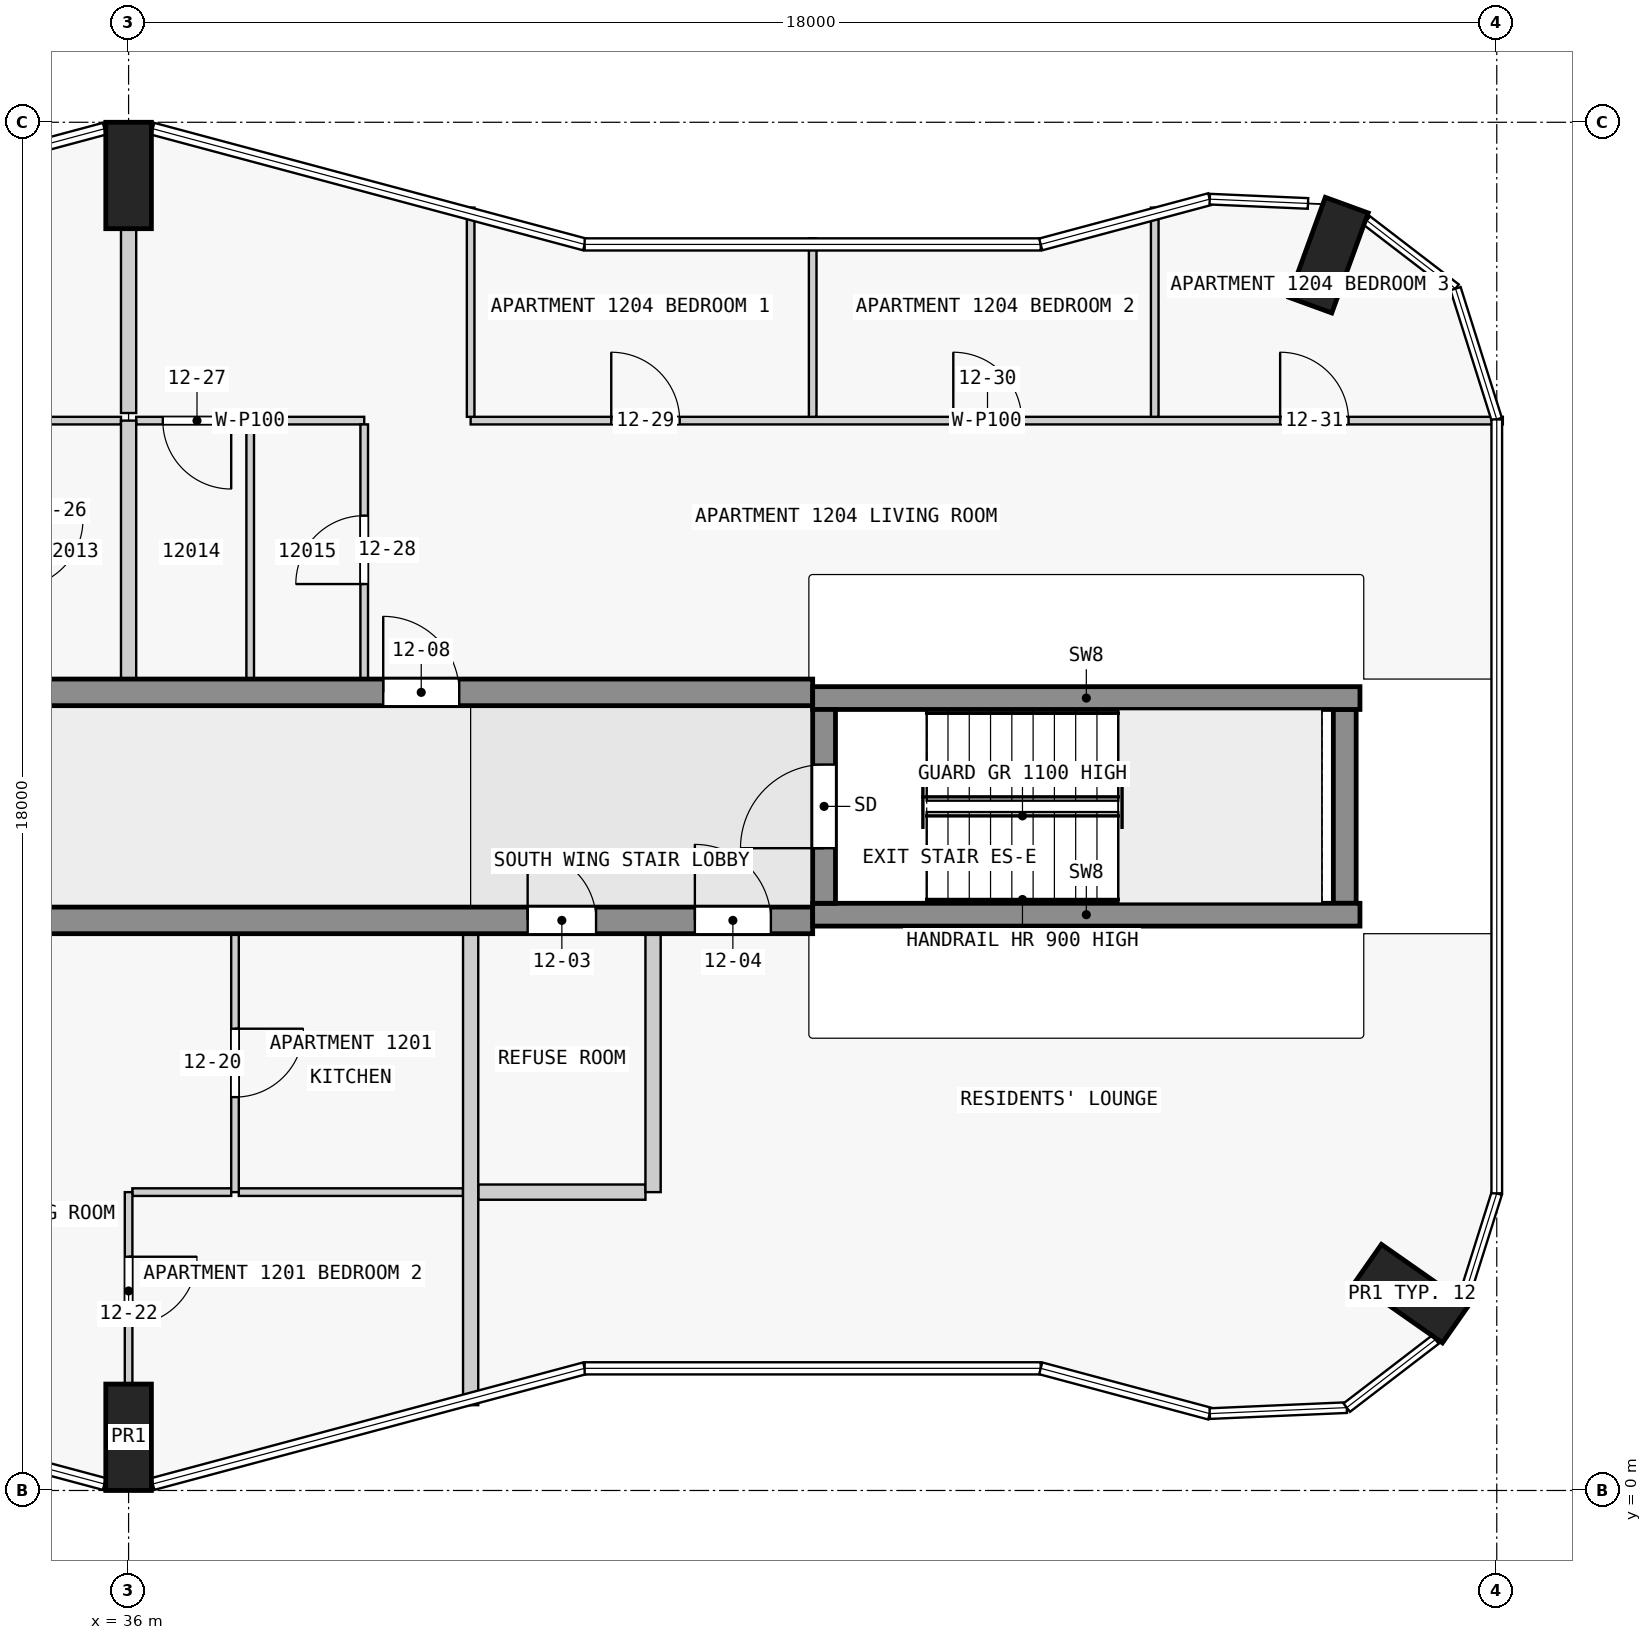
"""IFC4 building model, lengths in metres.
Left out: names, types, materials, properties, quantities, classifications, styles, units other than length and angle.
Written with IfcOpenShell. Run it as: python <this file> out.ifc"""

import sys

from ifc_helpers import new_model, si_unit, direction, frame, frame_2d, origin, origin_2d, place, context, subcontext, project, spatial, rectangle, extrude, element, fill, save


model = new_model("IFC4")
c1 = context("Model", 3, precision=1e-05, world=origin(), true_north=direction((0.0, 1.0)))
c2 = subcontext(c1, "Body", "Model", "MODEL_VIEW")
j1 = project(units=[si_unit("LENGTHUNIT", "METRE"), si_unit("PLANEANGLEUNIT", "RADIAN")], contexts=[c1])
p1 = place(None, origin())
s1 = spatial("IfcSite", under=j1, at=p1, CompositionType="ELEMENT")
p2 = place(p1, origin())
s2 = spatial("IfcBuilding", under=s1, at=p2, CompositionType="ELEMENT")
p3 = place(p2, frame((0.0, 0.0, 51.3)))
s3 = spatial("IfcBuildingStorey", under=s2, at=p3, CompositionType="ELEMENT", Elevation=51.3)
for number, where, z_axis, x_axis in (
    (1, (36.0, 0.7, 0.0), (0.0, 0.0, 1.0), (1.0, 0.0, 0.0)),
    (2, (52.884, 2.59, 0.0), (0.0, 0.0, 1.0), (0.574, 0.819, 0.0)),
    (3, (51.787, 16.252, 0.0), (0.0, 0.0, 1.0), (-0.94, 0.342, 0.0)),
    (4, (36.0, 17.3, 0.0), (0.0, 0.0, 1.0), (1.0, 0.0, 0.0)),
):
    element("IfcColumn", number, at=place(p3, frame(where, z_axis=z_axis, x_axis=x_axis)), inside=s3, PredefinedType="COLUMN", context=c2, shape_type="SweptSolid", body=[
        extrude(rectangle(XDim=0.6, YDim=1.4, at=origin_2d()), origin(), (0.0, 0.0, 1.0), 3.5),
    ])
p4 = place(p3, frame((45.15, 7.725, 0.0), z_axis=(0.0, 0.0, 1.0), x_axis=(0.0, 1.0, 0.0)))
e5 = element("IfcWall", 5, at=p4, inside=s3, PredefinedType="SHEAR", context=c2, shape_type="SweptSolid", body=[
    extrude(rectangle(XDim=2.55, YDim=0.3, at=frame_2d((1.275, 0.0))), origin(), (0.0, 0.0, 1.0), 3.5),
])
p5 = place(p4, frame((0.725, 0.0, 0.0)))
e6 = element("IfcOpeningElement", 6, at=p5, cuts=e5, PredefinedType="OPENING", context=c2, shape_type="SweptSolid", body=[
    extrude(rectangle(XDim=1.1, YDim=2.1, at=frame_2d((0.55, 1.05))), frame((0.0, 0.16, 0.0), z_axis=(0.0, -1.0, 0.0), x_axis=(1.0, 0.0, 0.0)), (0.0, 0.0, 1.0), 0.32),
])
p6 = place(p3, frame((52.0, 7.725, 0.0), z_axis=(0.0, 0.0, 1.0), x_axis=(0.0, 1.0, 0.0)))
e7 = element("IfcWall", 7, at=p6, inside=s3, PredefinedType="SHEAR", context=c2, shape_type="SweptSolid", body=[
    extrude(rectangle(XDim=2.55, YDim=0.3, at=frame_2d((1.275, 0.0))), origin(), (0.0, 0.0, 1.0), 3.5),
])
for number, where, z_axis, x_axis in (
    (8, (45.0, 7.575, 0.0), (0.0, 0.0, 1.0), (1.0, 0.0, 0.0)),
    (9, (45.0, 10.425, 0.0), (0.0, 0.0, 1.0), (1.0, 0.0, 0.0)),
):
    element("IfcWall", number, at=place(p3, frame(where, z_axis=z_axis, x_axis=x_axis)), inside=s3, PredefinedType="SHEAR", context=c2, shape_type="SweptSolid", body=[
        extrude(rectangle(XDim=7.2, YDim=0.3, at=frame_2d((3.6, 0.0))), origin(), (0.0, 0.0, 1.0), 3.5),
    ])
p7 = place(p3, frame((22.5, 7.5, 0.0), z_axis=(0.0, 0.0, 1.0), x_axis=(1.0, 0.0, 0.0)))
e10 = element("IfcWall", 10, at=p7, inside=s3, PredefinedType="SHEAR", context=c2, shape_type="SweptSolid", body=[
    extrude(rectangle(XDim=22.5, YDim=0.35, at=frame_2d((11.25, 0.0))), origin(), (0.0, 0.0, 1.0), 3.25),
])
p8 = place(p7, frame((1.75, 0.0, 0.0)))
e11 = element("IfcOpeningElement", 11, at=p8, cuts=e10, PredefinedType="OPENING", context=c2, shape_type="SweptSolid", body=[
    extrude(rectangle(XDim=1.0, YDim=2.1, at=frame_2d((0.5, 1.05))), frame((0.0, 0.185, 0.0), z_axis=(0.0, -1.0, 0.0), x_axis=(1.0, 0.0, 0.0)), (0.0, 0.0, 1.0), 0.37),
])
p9 = place(p7, frame((10.15, 0.0, 0.0)))
e12 = element("IfcOpeningElement", 12, at=p9, cuts=e10, PredefinedType="OPENING", context=c2, shape_type="SweptSolid", body=[
    extrude(rectangle(XDim=1.0, YDim=2.1, at=frame_2d((0.5, 1.05))), frame((0.0, 0.185, 0.0), z_axis=(0.0, -1.0, 0.0), x_axis=(1.0, 0.0, 0.0)), (0.0, 0.0, 1.0), 0.37),
])
p10 = place(p7, frame((18.75, 0.0, 0.0)))
e13 = element("IfcOpeningElement", 13, at=p10, cuts=e10, PredefinedType="OPENING", context=c2, shape_type="SweptSolid", body=[
    extrude(rectangle(XDim=0.9, YDim=2.1, at=frame_2d((0.45, 1.05))), frame((0.0, 0.185, 0.0), z_axis=(0.0, -1.0, 0.0), x_axis=(1.0, 0.0, 0.0)), (0.0, 0.0, 1.0), 0.37),
])
p11 = place(p7, frame((20.95, 0.0, 0.0)))
e14 = element("IfcOpeningElement", 14, at=p11, cuts=e10, PredefinedType="OPENING", context=c2, shape_type="SweptSolid", body=[
    extrude(rectangle(XDim=1.0, YDim=2.1, at=frame_2d((0.5, 1.05))), frame((0.0, 0.185, 0.0), z_axis=(0.0, -1.0, 0.0), x_axis=(1.0, 0.0, 0.0)), (0.0, 0.0, 1.0), 0.37),
])
p12 = place(p3, frame((22.5, 10.5, 0.0), z_axis=(0.0, 0.0, 1.0), x_axis=(1.0, 0.0, 0.0)))
e15 = element("IfcWall", 15, at=p12, inside=s3, PredefinedType="SHEAR", context=c2, shape_type="SweptSolid", body=[
    extrude(rectangle(XDim=22.5, YDim=0.35, at=frame_2d((11.25, 0.0))), origin(), (0.0, 0.0, 1.0), 3.25),
])
p13 = place(p12, frame((1.75, 0.0, 0.0)))
e16 = element("IfcOpeningElement", 16, at=p13, cuts=e15, PredefinedType="OPENING", context=c2, shape_type="SweptSolid", body=[
    extrude(rectangle(XDim=1.0, YDim=2.1, at=frame_2d((0.5, 1.05))), frame((0.0, 0.185, 0.0), z_axis=(0.0, -1.0, 0.0), x_axis=(1.0, 0.0, 0.0)), (0.0, 0.0, 1.0), 0.37),
])
p14 = place(p12, frame((6.25, 0.0, 0.0)))
e17 = element("IfcOpeningElement", 17, at=p14, cuts=e15, PredefinedType="OPENING", context=c2, shape_type="SweptSolid", body=[
    extrude(rectangle(XDim=1.0, YDim=2.1, at=frame_2d((0.5, 1.05))), frame((0.0, 0.185, 0.0), z_axis=(0.0, -1.0, 0.0), x_axis=(1.0, 0.0, 0.0)), (0.0, 0.0, 1.0), 0.37),
])
p15 = place(p12, frame((10.75, 0.0, 0.0)))
e18 = element("IfcOpeningElement", 18, at=p15, cuts=e15, PredefinedType="OPENING", context=c2, shape_type="SweptSolid", body=[
    extrude(rectangle(XDim=1.0, YDim=2.1, at=frame_2d((0.5, 1.05))), frame((0.0, 0.185, 0.0), z_axis=(0.0, -1.0, 0.0), x_axis=(1.0, 0.0, 0.0)), (0.0, 0.0, 1.0), 0.37),
])
p16 = place(p12, frame((16.85, 0.0, 0.0)))
e19 = element("IfcOpeningElement", 19, at=p16, cuts=e15, PredefinedType="OPENING", context=c2, shape_type="SweptSolid", body=[
    extrude(rectangle(XDim=1.0, YDim=2.1, at=frame_2d((0.5, 1.05))), frame((0.0, 0.185, 0.0), z_axis=(0.0, -1.0, 0.0), x_axis=(1.0, 0.0, 0.0)), (0.0, 0.0, 1.0), 0.37),
])
p17 = place(p3, frame((37.35, 3.925, 0.0), z_axis=(0.0, 0.0, 1.0), x_axis=(-1.0, 0.0, 0.0)))
e20 = element("IfcWall", 20, at=p17, inside=s3, PredefinedType="PARTITIONING", context=c2, shape_type="SweptSolid", body=[
    extrude(rectangle(XDim=1.3, YDim=0.1, at=frame_2d((0.65, 0.0))), origin(), (0.0, 0.0, 1.0), 3.25),
])
p18 = place(p3, frame((37.45, 3.925, 0.0), z_axis=(0.0, 0.0, 1.0), x_axis=(1.0, 0.0, 0.0)))
e21 = element("IfcWall", 21, at=p18, inside=s3, PredefinedType="PARTITIONING", context=c2, shape_type="SweptSolid", body=[
    extrude(rectangle(XDim=2.95, YDim=0.1, at=frame_2d((1.475, 0.0))), origin(), (0.0, 0.0, 1.0), 3.25),
])
p19 = place(p3, frame((40.6, 3.925, 0.0), z_axis=(0.0, 0.0, 1.0), x_axis=(1.0, 0.0, 0.0)))
e22 = element("IfcWall", 22, at=p19, inside=s3, PredefinedType="PARTITIONING", context=c2, shape_type="SweptSolid", body=[
    extrude(rectangle(XDim=2.2, YDim=0.2, at=frame_2d((1.1, 0.0))), origin(), (0.0, 0.0, 1.0), 3.25),
])
p20 = place(p3, frame((35.9, 14.075, 0.0), z_axis=(0.0, 0.0, 1.0), x_axis=(-1.0, 0.0, 0.0)))
e23 = element("IfcWall", 23, at=p20, inside=s3, PredefinedType="PARTITIONING", context=c2, shape_type="SweptSolid", body=[
    extrude(rectangle(XDim=1.4, YDim=0.1, at=frame_2d((0.7, 0.0))), origin(), (0.0, 0.0, 1.0), 3.25),
])
p21 = place(p3, frame((39.1, 14.075, 0.0), z_axis=(0.0, 0.0, 1.0), x_axis=(-1.0, 0.0, 0.0)))
e24 = element("IfcWall", 24, at=p21, inside=s3, PredefinedType="PARTITIONING", context=c2, shape_type="SweptSolid", body=[
    extrude(rectangle(XDim=3.0, YDim=0.1, at=frame_2d((1.5, 0.0))), origin(), (0.0, 0.0, 1.0), 3.25),
])
p22 = place(p21, frame((1.75, 0.0, 0.0)))
e25 = element("IfcOpeningElement", 25, at=p22, cuts=e24, PredefinedType="OPENING", context=c2, shape_type="SweptSolid", body=[
    extrude(rectangle(XDim=0.9, YDim=2.1, at=frame_2d((0.45, 1.05))), frame((0.0, 0.06, 0.0), z_axis=(0.0, -1.0, 0.0), x_axis=(1.0, 0.0, 0.0)), (0.0, 0.0, 1.0), 0.12),
])
p23 = place(p3, frame((40.5, 14.075, 0.0), z_axis=(0.0, 0.0, 1.0), x_axis=(1.0, 0.0, 0.0)))
e26 = element("IfcWall", 26, at=p23, inside=s3, PredefinedType="PARTITIONING", context=c2, shape_type="SweptSolid", body=[
    extrude(rectangle(XDim=13.58, YDim=0.1, at=frame_2d((6.79, 0.0))), origin(), (0.0, 0.0, 1.0), 3.25),
])
p24 = place(p23, frame((1.85, 0.0, 0.0)))
e27 = element("IfcOpeningElement", 27, at=p24, cuts=e26, PredefinedType="OPENING", context=c2, shape_type="SweptSolid", body=[
    extrude(rectangle(XDim=0.9, YDim=2.1, at=frame_2d((0.45, 1.05))), frame((0.0, 0.06, 0.0), z_axis=(0.0, -1.0, 0.0), x_axis=(1.0, 0.0, 0.0)), (0.0, 0.0, 1.0), 0.12),
])
p25 = place(p23, frame((6.35, 0.0, 0.0)))
e28 = element("IfcOpeningElement", 28, at=p25, cuts=e26, PredefinedType="OPENING", context=c2, shape_type="SweptSolid", body=[
    extrude(rectangle(XDim=0.9, YDim=2.1, at=frame_2d((0.45, 1.05))), frame((0.0, 0.06, 0.0), z_axis=(0.0, -1.0, 0.0), x_axis=(1.0, 0.0, 0.0)), (0.0, 0.0, 1.0), 0.12),
])
p26 = place(p23, frame((10.65, 0.0, 0.0)))
e29 = element("IfcOpeningElement", 29, at=p26, cuts=e26, PredefinedType="OPENING", context=c2, shape_type="SweptSolid", body=[
    extrude(rectangle(XDim=0.9, YDim=2.1, at=frame_2d((0.45, 1.05))), frame((0.0, 0.06, 0.0), z_axis=(0.0, -1.0, 0.0), x_axis=(1.0, 0.0, 0.0)), (0.0, 0.0, 1.0), 0.12),
])
p27 = place(p3, frame((36.0, 3.925, 0.0), z_axis=(0.0, 0.0, 1.0), x_axis=(0.0, -1.0, 0.0)))
e30 = element("IfcWall", 30, at=p27, inside=s3, PredefinedType="PARTITIONING", context=c2, shape_type="SweptSolid", body=[
    extrude(rectangle(XDim=2.525, YDim=0.1, at=frame_2d((1.263, 0.0))), origin(), (0.0, 0.0, 1.0), 3.25),
])
p28 = place(p27, frame((0.85, 0.0, 0.0)))
e31 = element("IfcOpeningElement", 31, at=p28, cuts=e30, PredefinedType="OPENING", context=c2, shape_type="SweptSolid", body=[
    extrude(rectangle(XDim=0.9, YDim=2.1, at=frame_2d((0.45, 1.05))), frame((0.0, 0.06, 0.0), z_axis=(0.0, -1.0, 0.0), x_axis=(1.0, 0.0, 0.0)), (0.0, 0.0, 1.0), 0.12),
])
p29 = place(p3, frame((36.0, 16.6, 0.0), z_axis=(0.0, 0.0, 1.0), x_axis=(0.0, -1.0, 0.0)))
e32 = element("IfcWall", 32, at=p29, inside=s3, PredefinedType="PARTITIONING", context=c2, shape_type="SweptSolid", body=[
    extrude(rectangle(XDim=2.425, YDim=0.2, at=frame_2d((1.212, 0.0))), origin(), (0.0, 0.0, 1.0), 3.25),
])
p30 = place(p3, frame((36.0, 10.675, 0.0), z_axis=(0.0, 0.0, 1.0), x_axis=(0.0, 1.0, 0.0)))
e33 = element("IfcWall", 33, at=p30, inside=s3, PredefinedType="PARTITIONING", context=c2, shape_type="SweptSolid", body=[
    extrude(rectangle(XDim=3.4, YDim=0.2, at=frame_2d((1.7, 0.0))), origin(), (0.0, 0.0, 1.0), 3.25),
])
p31 = place(p3, frame((37.4, 7.325, 0.0), z_axis=(0.0, 0.0, 1.0), x_axis=(0.0, -1.0, 0.0)))
e34 = element("IfcWall", 34, at=p31, inside=s3, PredefinedType="PARTITIONING", context=c2, shape_type="SweptSolid", body=[
    extrude(rectangle(XDim=3.4, YDim=0.1, at=frame_2d((1.7, 0.0))), origin(), (0.0, 0.0, 1.0), 3.25),
])
p32 = place(p31, frame((1.25, 0.0, 0.0)))
e35 = element("IfcOpeningElement", 35, at=p32, cuts=e34, PredefinedType="OPENING", context=c2, shape_type="SweptSolid", body=[
    extrude(rectangle(XDim=0.9, YDim=2.1, at=frame_2d((0.45, 1.05))), frame((0.0, 0.06, 0.0), z_axis=(0.0, -1.0, 0.0), x_axis=(1.0, 0.0, 0.0)), (0.0, 0.0, 1.0), 0.12),
])
p33 = place(p3, frame((37.6, 10.675, 0.0), z_axis=(0.0, 0.0, 1.0), x_axis=(0.0, 1.0, 0.0)))
e36 = element("IfcWall", 36, at=p33, inside=s3, PredefinedType="PARTITIONING", context=c2, shape_type="SweptSolid", body=[
    extrude(rectangle(XDim=3.35, YDim=0.1, at=frame_2d((1.675, 0.0))), origin(), (0.0, 0.0, 1.0), 3.25),
])
p34 = place(p3, frame((39.1, 10.675, 0.0), z_axis=(0.0, 0.0, 1.0), x_axis=(0.0, 1.0, 0.0)))
e37 = element("IfcWall", 37, at=p34, inside=s3, PredefinedType="PARTITIONING", context=c2, shape_type="SweptSolid", body=[
    extrude(rectangle(XDim=3.35, YDim=0.1, at=frame_2d((1.675, 0.0))), origin(), (0.0, 0.0, 1.0), 3.25),
])
p35 = place(p34, frame((1.25, 0.0, 0.0)))
e38 = element("IfcOpeningElement", 38, at=p35, cuts=e37, PredefinedType="OPENING", context=c2, shape_type="SweptSolid", body=[
    extrude(rectangle(XDim=0.9, YDim=2.1, at=frame_2d((0.45, 1.05))), frame((0.0, 0.06, 0.0), z_axis=(0.0, -1.0, 0.0), x_axis=(1.0, 0.0, 0.0)), (0.0, 0.0, 1.0), 0.12),
])
p36 = place(p3, frame((40.5, 16.878, 0.0), z_axis=(0.0, 0.0, 1.0), x_axis=(0.0, -1.0, 0.0)))
e39 = element("IfcWall", 39, at=p36, inside=s3, PredefinedType="PARTITIONING", context=c2, shape_type="SweptSolid", body=[
    extrude(rectangle(XDim=2.753, YDim=0.1, at=frame_2d((1.376, 0.0))), origin(), (0.0, 0.0, 1.0), 3.25),
])
p37 = place(p3, frame((40.5, 1.122, 0.0), z_axis=(0.0, 0.0, 1.0), x_axis=(0.0, 1.0, 0.0)))
e40 = element("IfcWall", 40, at=p37, inside=s3, PredefinedType="PARTITIONING", context=c2, shape_type="SweptSolid", body=[
    extrude(rectangle(XDim=6.203, YDim=0.2, at=frame_2d((3.101, 0.0))), origin(), (0.0, 0.0, 1.0), 3.25),
])
p38 = place(p3, frame((42.9, 3.925, 0.0), z_axis=(0.0, 0.0, 1.0), x_axis=(0.0, 1.0, 0.0)))
e41 = element("IfcWall", 41, at=p38, inside=s3, PredefinedType="PARTITIONING", context=c2, shape_type="SweptSolid", body=[
    extrude(rectangle(XDim=3.4, YDim=0.2, at=frame_2d((1.7, 0.0))), origin(), (0.0, 0.0, 1.0), 3.25),
])
p39 = place(p3, frame((45.0, 14.125, 0.0), z_axis=(0.0, 0.0, 1.0), x_axis=(0.0, 1.0, 0.0)))
e42 = element("IfcWall", 42, at=p39, inside=s3, PredefinedType="PARTITIONING", context=c2, shape_type="SweptSolid", body=[
    extrude(rectangle(XDim=2.348, YDim=0.1, at=frame_2d((1.174, 0.0))), origin(), (0.0, 0.0, 1.0), 3.25),
])
p40 = place(p3, frame((49.5, 14.125, 0.0), z_axis=(0.0, 0.0, 1.0), x_axis=(0.0, 1.0, 0.0)))
e43 = element("IfcWall", 43, at=p40, inside=s3, PredefinedType="PARTITIONING", context=c2, shape_type="SweptSolid", body=[
    extrude(rectangle(XDim=2.753, YDim=0.1, at=frame_2d((1.376, 0.0))), origin(), (0.0, 0.0, 1.0), 3.25),
])
p41 = place(p5, origin())
e44 = element("IfcDoor", 44, at=p41, inside=s3, OperationType="SINGLE_SWING_LEFT", PredefinedType="DOOR", context=c2, shape_type="SweptSolid", body=[
    extrude(rectangle(XDim=1.1, YDim=2.1, at=frame_2d((0.55, 1.05))), frame((0.0, 0.025, 0.0), z_axis=(0.0, -1.0, 0.0), x_axis=(1.0, 0.0, 0.0)), (0.0, 0.0, 1.0), 0.05),
])
fill(e6, e44)
p42 = place(p10, origin())
e45 = element("IfcDoor", 45, at=p42, inside=s3, OperationType="SINGLE_SWING_RIGHT", PredefinedType="DOOR", context=c2, shape_type="SweptSolid", body=[
    extrude(rectangle(XDim=0.9, YDim=2.1, at=frame_2d((0.45, 1.05))), frame((0.0, 0.025, 0.0), z_axis=(0.0, -1.0, 0.0), x_axis=(1.0, 0.0, 0.0)), (0.0, 0.0, 1.0), 0.05),
])
fill(e13, e45)
p43 = place(p11, origin())
e46 = element("IfcDoor", 46, at=p43, inside=s3, OperationType="SINGLE_SWING_RIGHT", PredefinedType="DOOR", context=c2, shape_type="SweptSolid", body=[
    extrude(rectangle(XDim=1.0, YDim=2.1, at=frame_2d((0.5, 1.05))), frame((0.0, 0.025, 0.0), z_axis=(0.0, -1.0, 0.0), x_axis=(1.0, 0.0, 0.0)), (0.0, 0.0, 1.0), 0.05),
])
fill(e14, e46)
p44 = place(p16, origin())
e47 = element("IfcDoor", 47, at=p44, inside=s3, OperationType="SINGLE_SWING_RIGHT", PredefinedType="DOOR", context=c2, shape_type="SweptSolid", body=[
    extrude(rectangle(XDim=1.0, YDim=2.1, at=frame_2d((0.5, 1.05))), frame((0.0, 0.025, 0.0), z_axis=(0.0, -1.0, 0.0), x_axis=(1.0, 0.0, 0.0)), (0.0, 0.0, 1.0), 0.05),
])
fill(e19, e47)
p45 = place(p32, origin())
e48 = element("IfcDoor", 48, at=p45, inside=s3, OperationType="SINGLE_SWING_LEFT", PredefinedType="DOOR", context=c2, shape_type="SweptSolid", body=[
    extrude(rectangle(XDim=0.9, YDim=2.1, at=frame_2d((0.45, 1.05))), frame((0.0, 0.025, 0.0), z_axis=(0.0, -1.0, 0.0), x_axis=(1.0, 0.0, 0.0)), (0.0, 0.0, 1.0), 0.05),
])
fill(e35, e48)
p46 = place(p28, origin())
e49 = element("IfcDoor", 49, at=p46, inside=s3, OperationType="SINGLE_SWING_RIGHT", PredefinedType="DOOR", context=c2, shape_type="SweptSolid", body=[
    extrude(rectangle(XDim=0.9, YDim=2.1, at=frame_2d((0.45, 1.05))), frame((0.0, 0.025, 0.0), z_axis=(0.0, -1.0, 0.0), x_axis=(1.0, 0.0, 0.0)), (0.0, 0.0, 1.0), 0.05),
])
fill(e31, e49)
p47 = place(p22, origin())
e50 = element("IfcDoor", 50, at=p47, inside=s3, OperationType="SINGLE_SWING_RIGHT", PredefinedType="DOOR", context=c2, shape_type="SweptSolid", body=[
    extrude(rectangle(XDim=0.9, YDim=2.1, at=frame_2d((0.45, 1.05))), frame((0.0, 0.025, 0.0), z_axis=(0.0, -1.0, 0.0), x_axis=(1.0, 0.0, 0.0)), (0.0, 0.0, 1.0), 0.05),
])
fill(e25, e50)
p48 = place(p35, origin())
e51 = element("IfcDoor", 51, at=p48, inside=s3, OperationType="SINGLE_SWING_RIGHT", PredefinedType="DOOR", context=c2, shape_type="SweptSolid", body=[
    extrude(rectangle(XDim=0.9, YDim=2.1, at=frame_2d((0.45, 1.05))), frame((0.0, 0.025, 0.0), z_axis=(0.0, -1.0, 0.0), x_axis=(1.0, 0.0, 0.0)), (0.0, 0.0, 1.0), 0.05),
])
fill(e38, e51)
p49 = place(p24, origin())
e52 = element("IfcDoor", 52, at=p49, inside=s3, OperationType="SINGLE_SWING_LEFT", PredefinedType="DOOR", context=c2, shape_type="SweptSolid", body=[
    extrude(rectangle(XDim=0.9, YDim=2.1, at=frame_2d((0.45, 1.05))), frame((0.0, 0.025, 0.0), z_axis=(0.0, -1.0, 0.0), x_axis=(1.0, 0.0, 0.0)), (0.0, 0.0, 1.0), 0.05),
])
fill(e27, e52)
p50 = place(p25, origin())
e53 = element("IfcDoor", 53, at=p50, inside=s3, OperationType="SINGLE_SWING_RIGHT", PredefinedType="DOOR", context=c2, shape_type="SweptSolid", body=[
    extrude(rectangle(XDim=0.9, YDim=2.1, at=frame_2d((0.45, 1.05))), frame((0.0, 0.025, 0.0), z_axis=(0.0, -1.0, 0.0), x_axis=(1.0, 0.0, 0.0)), (0.0, 0.0, 1.0), 0.05),
])
fill(e28, e53)
p51 = place(p26, origin())
e54 = element("IfcDoor", 54, at=p51, inside=s3, OperationType="SINGLE_SWING_RIGHT", PredefinedType="DOOR", context=c2, shape_type="SweptSolid", body=[
    extrude(rectangle(XDim=0.9, YDim=2.1, at=frame_2d((0.45, 1.05))), frame((0.0, 0.025, 0.0), z_axis=(0.0, -1.0, 0.0), x_axis=(1.0, 0.0, 0.0)), (0.0, 0.0, 1.0), 0.05),
])
fill(e29, e54)
save(model, sys.argv[1])
